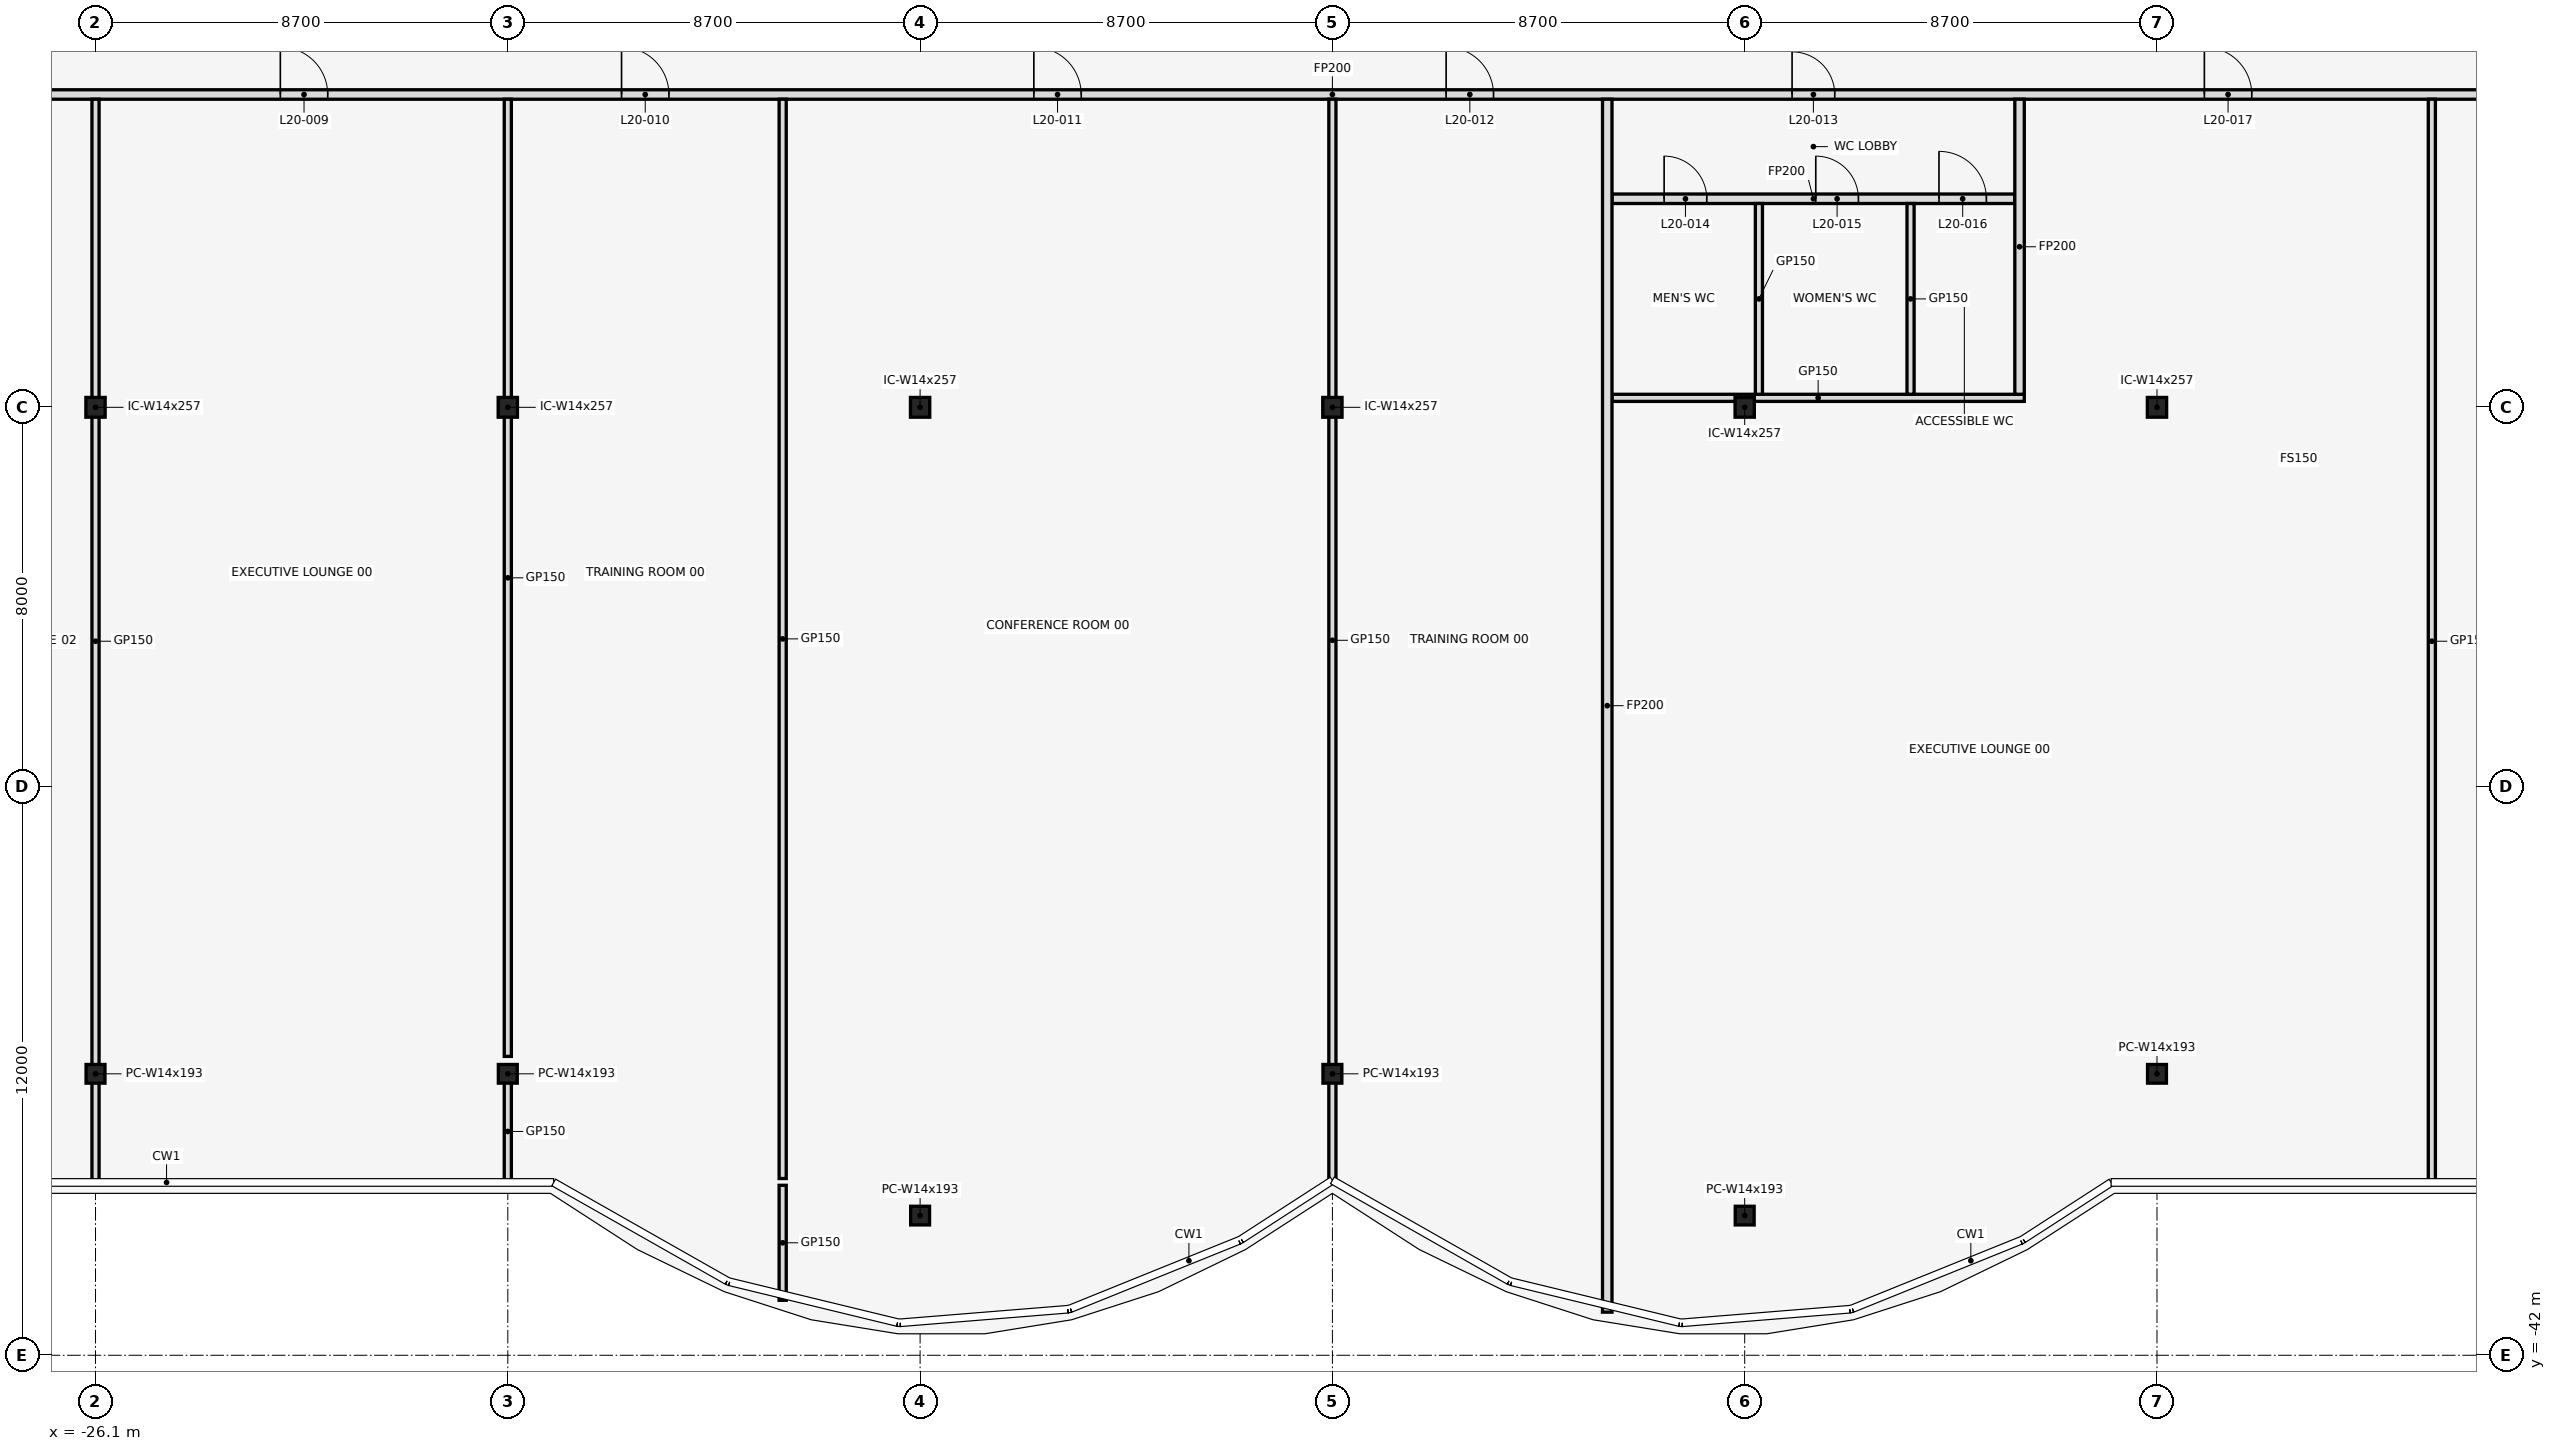
"""IFC4 building model, lengths in metres.
Left out: names, types, materials, properties, quantities, classifications, styles, units other than length and angle.
Written with IfcOpenShell. Run it as: python <this file> out.ifc"""

import sys

from ifc_helpers import new_model, si_unit, direction, frame, frame_2d, origin, origin_2d, place, context, subcontext, project, spatial, rectangle, i_section, extrude, element, fill, save


model = new_model("IFC4")
c1 = context("Model", 3, precision=1e-05, world=origin(), true_north=direction((0.0, 1.0)))
c2 = subcontext(c1, "Body", "Model", "MODEL_VIEW")
j1 = project(units=[si_unit("LENGTHUNIT", "METRE"), si_unit("PLANEANGLEUNIT", "RADIAN")], contexts=[c1])
p1 = place(None, origin())
s1 = spatial("IfcSite", under=j1, at=p1, CompositionType="ELEMENT")
p2 = place(p1, origin())
s2 = spatial("IfcBuilding", under=s1, at=p2, CompositionType="ELEMENT")
p3 = place(p2, frame((0.0, 0.0, 98.1)))
s3 = spatial("IfcBuildingStorey", under=s2, at=p3, CompositionType="ELEMENT", Elevation=98.1)
for number, where, z_axis, x_axis in (
    (1, (-26.1, -36.062, 0.0), (0.0, 0.0, 1.0), (1.0, 0.0, 0.0)),
    (2, (-17.4, -36.062, 0.0), (0.0, 0.0, 1.0), (1.0, 0.0, 0.0)),
    (3, (-8.7, -39.053, 0.0), (0.0, 0.0, 1.0), (1.0, 0.0, 0.0)),
    (4, (0.0, -36.062, 0.0), (0.0, 0.0, 1.0), (1.0, 0.0, 0.0)),
    (5, (8.7, -39.053, 0.0), (0.0, 0.0, 1.0), (1.0, 0.0, 0.0)),
    (6, (17.4, -36.062, 0.0), (0.0, 0.0, 1.0), (1.0, 0.0, 0.0)),
):
    element("IfcColumn", number, at=place(p3, frame(where, z_axis=z_axis, x_axis=x_axis)), inside=s3, PredefinedType="COLUMN", context=c2, shape_type="SweptSolid", body=[
        extrude(i_section(OverallWidth=0.399, OverallDepth=0.394, WebThickness=0.023, FlangeThickness=0.037, at=origin_2d()), origin(), (0.0, 0.0, 1.0), 4.1),
    ])
for number, where, z_axis, x_axis in (
    (7, (-26.1, -22.0, 0.0), (0.0, 0.0, 1.0), (1.0, 0.0, 0.0)),
    (8, (-17.4, -22.0, 0.0), (0.0, 0.0, 1.0), (1.0, 0.0, 0.0)),
    (9, (-8.7, -22.0, 0.0), (0.0, 0.0, 1.0), (1.0, 0.0, 0.0)),
    (10, (0.0, -22.0, 0.0), (0.0, 0.0, 1.0), (1.0, 0.0, 0.0)),
    (11, (8.7, -22.0, 0.0), (0.0, 0.0, 1.0), (1.0, 0.0, 0.0)),
    (12, (17.4, -22.0, 0.0), (0.0, 0.0, 1.0), (1.0, 0.0, 0.0)),
):
    element("IfcColumn", number, at=place(p3, frame(where, z_axis=z_axis, x_axis=x_axis)), inside=s3, PredefinedType="COLUMN", context=c2, shape_type="SweptSolid", body=[
        extrude(i_section(OverallWidth=0.406, OverallDepth=0.417, WebThickness=0.03, FlangeThickness=0.048, at=origin_2d()), origin(), (0.0, 0.0, 1.0), 4.1),
    ])
p4 = place(p3, frame((5.9, -21.8, 0.0), z_axis=(0.0, 0.0, 1.0), x_axis=(1.0, 0.0, 0.0)))
e13 = element("IfcWall", 13, at=p4, inside=s3, PredefinedType="PARTITIONING", context=c2, shape_type="SweptSolid", body=[
    extrude(rectangle(XDim=8.7, YDim=0.15, at=frame_2d((4.35, 0.0))), origin(), (0.0, 0.0, 1.0), 3.018),
])
p5 = place(p3, frame((5.9, -17.6, 0.0), z_axis=(0.0, 0.0, 1.0), x_axis=(1.0, 0.0, 0.0)))
e14 = element("IfcWall", 14, at=p5, inside=s3, PredefinedType="PARTITIONING", context=c2, shape_type="SweptSolid", body=[
    extrude(rectangle(XDim=8.5, YDim=0.2, at=frame_2d((4.25, 0.0))), origin(), (0.0, 0.0, 1.0), 3.018),
])
p6 = place(p5, frame((1.1, 0.0, 0.0)))
e15 = element("IfcOpeningElement", 15, at=p6, cuts=e14, PredefinedType="OPENING", context=c2, shape_type="SweptSolid", body=[
    extrude(rectangle(XDim=0.9, YDim=2.1, at=frame_2d((0.45, 1.05))), frame((0.0, 0.112, 0.0), z_axis=(0.0, -1.0, 0.0), x_axis=(1.0, 0.0, 0.0)), (0.0, 0.0, 1.0), 0.224),
])
p7 = place(p5, frame((4.3, 0.0, 0.0)))
e16 = element("IfcOpeningElement", 16, at=p7, cuts=e14, PredefinedType="OPENING", context=c2, shape_type="SweptSolid", body=[
    extrude(rectangle(XDim=0.9, YDim=2.1, at=frame_2d((0.45, 1.05))), frame((0.0, 0.112, 0.0), z_axis=(0.0, -1.0, 0.0), x_axis=(1.0, 0.0, 0.0)), (0.0, 0.0, 1.0), 0.224),
])
p8 = place(p5, frame((6.9, 0.0, 0.0)))
e17 = element("IfcOpeningElement", 17, at=p8, cuts=e14, PredefinedType="OPENING", context=c2, shape_type="SweptSolid", body=[
    extrude(rectangle(XDim=1.0, YDim=2.1, at=frame_2d((0.5, 1.05))), frame((0.0, 0.112, 0.0), z_axis=(0.0, -1.0, 0.0), x_axis=(1.0, 0.0, 0.0)), (0.0, 0.0, 1.0), 0.224),
])
p9 = place(p3, frame((-35.68, -15.4, 0.0), z_axis=(0.0, 0.0, 1.0), x_axis=(1.0, 0.0, 0.0)))
e18 = element("IfcWall", 18, at=p9, inside=s3, PredefinedType="PARTITIONING", context=c2, shape_type="SweptSolid", body=[
    extrude(rectangle(XDim=71.36, YDim=0.2, at=frame_2d((35.68, 0.0))), origin(), (0.0, 0.0, 1.0), 3.018),
])
p10 = place(p9, frame((2.8, 0.0, 0.0)))
e19 = element("IfcOpeningElement", 19, at=p10, cuts=e18, PredefinedType="OPENING", context=c2, shape_type="SweptSolid", body=[
    extrude(rectangle(XDim=1.0, YDim=2.1, at=frame_2d((0.5, 1.05))), frame((0.0, 0.112, 0.0), z_axis=(0.0, -1.0, 0.0), x_axis=(1.0, 0.0, 0.0)), (0.0, 0.0, 1.0), 0.224),
])
p11 = place(p9, frame((7.58, 0.0, 0.0)))
e20 = element("IfcOpeningElement", 20, at=p11, cuts=e18, PredefinedType="OPENING", context=c2, shape_type="SweptSolid", body=[
    extrude(rectangle(XDim=1.0, YDim=2.1, at=frame_2d((0.5, 1.05))), frame((0.0, 0.112, 0.0), z_axis=(0.0, -1.0, 0.0), x_axis=(1.0, 0.0, 0.0)), (0.0, 0.0, 1.0), 0.224),
])
p12 = place(p9, frame((13.48, 0.0, 0.0)))
e21 = element("IfcOpeningElement", 21, at=p12, cuts=e18, PredefinedType="OPENING", context=c2, shape_type="SweptSolid", body=[
    extrude(rectangle(XDim=1.0, YDim=2.1, at=frame_2d((0.5, 1.05))), frame((0.0, 0.112, 0.0), z_axis=(0.0, -1.0, 0.0), x_axis=(1.0, 0.0, 0.0)), (0.0, 0.0, 1.0), 0.224),
])
p13 = place(p9, frame((20.68, 0.0, 0.0)))
e22 = element("IfcOpeningElement", 22, at=p13, cuts=e18, PredefinedType="OPENING", context=c2, shape_type="SweptSolid", body=[
    extrude(rectangle(XDim=1.0, YDim=2.1, at=frame_2d((0.5, 1.05))), frame((0.0, 0.112, 0.0), z_axis=(0.0, -1.0, 0.0), x_axis=(1.0, 0.0, 0.0)), (0.0, 0.0, 1.0), 0.224),
])
p14 = place(p9, frame((29.38, 0.0, 0.0)))
e23 = element("IfcOpeningElement", 23, at=p14, cuts=e18, PredefinedType="OPENING", context=c2, shape_type="SweptSolid", body=[
    extrude(rectangle(XDim=1.0, YDim=2.1, at=frame_2d((0.5, 1.05))), frame((0.0, 0.112, 0.0), z_axis=(0.0, -1.0, 0.0), x_axis=(1.0, 0.0, 0.0)), (0.0, 0.0, 1.0), 0.224),
])
p15 = place(p9, frame((38.08, 0.0, 0.0)))
e24 = element("IfcOpeningElement", 24, at=p15, cuts=e18, PredefinedType="OPENING", context=c2, shape_type="SweptSolid", body=[
    extrude(rectangle(XDim=1.0, YDim=2.1, at=frame_2d((0.5, 1.05))), frame((0.0, 0.112, 0.0), z_axis=(0.0, -1.0, 0.0), x_axis=(1.0, 0.0, 0.0)), (0.0, 0.0, 1.0), 0.224),
])
p16 = place(p9, frame((45.38, 0.0, 0.0)))
e25 = element("IfcOpeningElement", 25, at=p16, cuts=e18, PredefinedType="OPENING", context=c2, shape_type="SweptSolid", body=[
    extrude(rectangle(XDim=0.9, YDim=2.1, at=frame_2d((0.45, 1.05))), frame((0.0, 0.112, 0.0), z_axis=(0.0, -1.0, 0.0), x_axis=(1.0, 0.0, 0.0)), (0.0, 0.0, 1.0), 0.224),
])
p17 = place(p9, frame((54.08, 0.0, 0.0)))
e26 = element("IfcOpeningElement", 26, at=p17, cuts=e18, PredefinedType="OPENING", context=c2, shape_type="SweptSolid", body=[
    extrude(rectangle(XDim=1.0, YDim=2.1, at=frame_2d((0.5, 1.05))), frame((0.0, 0.112, 0.0), z_axis=(0.0, -1.0, 0.0), x_axis=(1.0, 0.0, 0.0)), (0.0, 0.0, 1.0), 0.224),
])
p18 = place(p9, frame((64.58, 0.0, 0.0)))
e27 = element("IfcOpeningElement", 27, at=p18, cuts=e18, PredefinedType="OPENING", context=c2, shape_type="SweptSolid", body=[
    extrude(rectangle(XDim=1.0, YDim=2.1, at=frame_2d((0.5, 1.05))), frame((0.0, 0.112, 0.0), z_axis=(0.0, -1.0, 0.0), x_axis=(1.0, 0.0, 0.0)), (0.0, 0.0, 1.0), 0.224),
])
p19 = place(p3, frame((-26.1, -38.37, 0.0), z_axis=(0.0, 0.0, 1.0), x_axis=(0.0, 1.0, 0.0)))
e28 = element("IfcWall", 28, at=p19, inside=s3, PredefinedType="PARTITIONING", context=c2, shape_type="SweptSolid", body=[
    extrude(rectangle(XDim=22.87, YDim=0.15, at=frame_2d((11.435, 0.0))), origin(), (0.0, 0.0, 1.0), 3.018),
])
p20 = place(p3, frame((-17.4, -38.37, 0.0), z_axis=(0.0, 0.0, 1.0), x_axis=(0.0, 1.0, 0.0)))
e29 = element("IfcWall", 29, at=p20, inside=s3, PredefinedType="PARTITIONING", context=c2, shape_type="SweptSolid", body=[
    extrude(rectangle(XDim=2.184, YDim=0.15, at=frame_2d((1.092, 0.0))), origin(), (0.0, 0.0, 1.0), 3.018),
])
p21 = place(p3, frame((-17.4, -35.694, 0.0), z_axis=(0.0, 0.0, 1.0), x_axis=(0.0, 1.0, 0.0)))
e30 = element("IfcWall", 30, at=p21, inside=s3, PredefinedType="PARTITIONING", context=c2, shape_type="SweptSolid", body=[
    extrude(rectangle(XDim=20.194, YDim=0.15, at=frame_2d((10.097, 0.0))), origin(), (0.0, 0.0, 1.0), 3.018),
])
p22 = place(p3, frame((-11.6, -40.84, 0.0), z_axis=(0.0, 0.0, 1.0), x_axis=(0.0, 1.0, 0.0)))
e31 = element("IfcWall", 31, at=p22, inside=s3, PredefinedType="PARTITIONING", context=c2, shape_type="SweptSolid", body=[
    extrude(rectangle(XDim=2.426, YDim=0.15, at=frame_2d((1.213, 0.0))), origin(), (0.0, 0.0, 1.0), 3.018),
])
p23 = place(p3, frame((-11.6, -38.271, 0.0), z_axis=(0.0, 0.0, 1.0), x_axis=(0.0, 1.0, 0.0)))
e32 = element("IfcWall", 32, at=p23, inside=s3, PredefinedType="PARTITIONING", context=c2, shape_type="SweptSolid", body=[
    extrude(rectangle(XDim=22.771, YDim=0.15, at=frame_2d((11.385, 0.0))), origin(), (0.0, 0.0, 1.0), 3.018),
])
p24 = place(p3, frame((0.0, -38.33, 0.0), z_axis=(0.0, 0.0, 1.0), x_axis=(0.0, 1.0, 0.0)))
e33 = element("IfcWall", 33, at=p24, inside=s3, PredefinedType="PARTITIONING", context=c2, shape_type="SweptSolid", body=[
    extrude(rectangle(XDim=22.83, YDim=0.15, at=frame_2d((11.415, 0.0))), origin(), (0.0, 0.0, 1.0), 3.018),
])
p25 = place(p3, frame((5.8, -41.09, 0.0), z_axis=(0.0, 0.0, 1.0), x_axis=(0.0, 1.0, 0.0)))
e34 = element("IfcWall", 34, at=p25, inside=s3, PredefinedType="PARTITIONING", context=c2, shape_type="SweptSolid", body=[
    extrude(rectangle(XDim=25.59, YDim=0.2, at=frame_2d((12.795, 0.0))), origin(), (0.0, 0.0, 1.0), 3.018),
])
for number, where, z_axis, x_axis in (
    (35, (9.0, -21.725, 0.0), (0.0, 0.0, 1.0), (0.0, 1.0, 0.0)),
    (36, (12.2, -21.725, 0.0), (0.0, 0.0, 1.0), (0.0, 1.0, 0.0)),
):
    element("IfcWall", number, at=place(p3, frame(where, z_axis=z_axis, x_axis=x_axis)), inside=s3, PredefinedType="PARTITIONING", context=c2, shape_type="SweptSolid", body=[
        extrude(rectangle(XDim=4.025, YDim=0.15, at=frame_2d((2.013, 0.0))), origin(), (0.0, 0.0, 1.0), 3.018),
    ])
p26 = place(p3, frame((14.5, -21.725, 0.0), z_axis=(0.0, 0.0, 1.0), x_axis=(0.0, 1.0, 0.0)))
e37 = element("IfcWall", 37, at=p26, inside=s3, PredefinedType="PARTITIONING", context=c2, shape_type="SweptSolid", body=[
    extrude(rectangle(XDim=6.225, YDim=0.2, at=frame_2d((3.113, 0.0))), origin(), (0.0, 0.0, 1.0), 3.018),
])
p27 = place(p3, frame((23.2, -38.37, 0.0), z_axis=(0.0, 0.0, 1.0), x_axis=(0.0, 1.0, 0.0)))
e38 = element("IfcWall", 38, at=p27, inside=s3, PredefinedType="PARTITIONING", context=c2, shape_type="SweptSolid", body=[
    extrude(rectangle(XDim=22.87, YDim=0.15, at=frame_2d((11.435, 0.0))), origin(), (0.0, 0.0, 1.0), 3.018),
])
p28 = place(p12, frame((1.0, 0.0, 0.0), z_axis=(0.0, 0.0, 1.0), x_axis=(-1.0, 0.0, 0.0)))
e39 = element("IfcDoor", 39, at=p28, inside=s3, OperationType="SINGLE_SWING_RIGHT", PredefinedType="DOOR", context=c2, shape_type="SweptSolid", body=[
    extrude(rectangle(XDim=1.0, YDim=2.1, at=frame_2d((0.5, 1.05))), frame((0.0, 0.025, 0.0), z_axis=(0.0, -1.0, 0.0), x_axis=(1.0, 0.0, 0.0)), (0.0, 0.0, 1.0), 0.05),
])
fill(e21, e39)
p29 = place(p13, frame((1.0, 0.0, 0.0), z_axis=(0.0, 0.0, 1.0), x_axis=(-1.0, 0.0, 0.0)))
e40 = element("IfcDoor", 40, at=p29, inside=s3, OperationType="SINGLE_SWING_LEFT", PredefinedType="DOOR", context=c2, shape_type="SweptSolid", body=[
    extrude(rectangle(XDim=1.0, YDim=2.1, at=frame_2d((0.5, 1.05))), frame((0.0, 0.025, 0.0), z_axis=(0.0, -1.0, 0.0), x_axis=(1.0, 0.0, 0.0)), (0.0, 0.0, 1.0), 0.05),
])
fill(e22, e40)
p30 = place(p14, frame((1.0, 0.0, 0.0), z_axis=(0.0, 0.0, 1.0), x_axis=(-1.0, 0.0, 0.0)))
e41 = element("IfcDoor", 41, at=p30, inside=s3, OperationType="SINGLE_SWING_RIGHT", PredefinedType="DOOR", context=c2, shape_type="SweptSolid", body=[
    extrude(rectangle(XDim=1.0, YDim=2.1, at=frame_2d((0.5, 1.05))), frame((0.0, 0.025, 0.0), z_axis=(0.0, -1.0, 0.0), x_axis=(1.0, 0.0, 0.0)), (0.0, 0.0, 1.0), 0.05),
])
fill(e23, e41)
p31 = place(p15, frame((1.0, 0.0, 0.0), z_axis=(0.0, 0.0, 1.0), x_axis=(-1.0, 0.0, 0.0)))
e42 = element("IfcDoor", 42, at=p31, inside=s3, OperationType="SINGLE_SWING_RIGHT", PredefinedType="DOOR", context=c2, shape_type="SweptSolid", body=[
    extrude(rectangle(XDim=1.0, YDim=2.1, at=frame_2d((0.5, 1.05))), frame((0.0, 0.025, 0.0), z_axis=(0.0, -1.0, 0.0), x_axis=(1.0, 0.0, 0.0)), (0.0, 0.0, 1.0), 0.05),
])
fill(e24, e42)
p32 = place(p16, frame((0.9, 0.0, 0.0), z_axis=(0.0, 0.0, 1.0), x_axis=(-1.0, 0.0, 0.0)))
e43 = element("IfcDoor", 43, at=p32, inside=s3, OperationType="SINGLE_SWING_LEFT", PredefinedType="DOOR", context=c2, shape_type="SweptSolid", body=[
    extrude(rectangle(XDim=0.9, YDim=2.1, at=frame_2d((0.45, 1.05))), frame((0.0, 0.025, 0.0), z_axis=(0.0, -1.0, 0.0), x_axis=(1.0, 0.0, 0.0)), (0.0, 0.0, 1.0), 0.05),
])
fill(e25, e43)
p33 = place(p6, frame((0.9, 0.0, 0.0), z_axis=(0.0, 0.0, 1.0), x_axis=(-1.0, 0.0, 0.0)))
e44 = element("IfcDoor", 44, at=p33, inside=s3, OperationType="SINGLE_SWING_RIGHT", PredefinedType="DOOR", context=c2, shape_type="SweptSolid", body=[
    extrude(rectangle(XDim=0.9, YDim=2.1, at=frame_2d((0.45, 1.05))), frame((0.0, 0.025, 0.0), z_axis=(0.0, -1.0, 0.0), x_axis=(1.0, 0.0, 0.0)), (0.0, 0.0, 1.0), 0.05),
])
fill(e15, e44)
p34 = place(p7, frame((0.9, 0.0, 0.0), z_axis=(0.0, 0.0, 1.0), x_axis=(-1.0, 0.0, 0.0)))
e45 = element("IfcDoor", 45, at=p34, inside=s3, OperationType="SINGLE_SWING_RIGHT", PredefinedType="DOOR", context=c2, shape_type="SweptSolid", body=[
    extrude(rectangle(XDim=0.9, YDim=2.1, at=frame_2d((0.45, 1.05))), frame((0.0, 0.025, 0.0), z_axis=(0.0, -1.0, 0.0), x_axis=(1.0, 0.0, 0.0)), (0.0, 0.0, 1.0), 0.05),
])
fill(e16, e45)
p35 = place(p8, frame((1.0, 0.0, 0.0), z_axis=(0.0, 0.0, 1.0), x_axis=(-1.0, 0.0, 0.0)))
e46 = element("IfcDoor", 46, at=p35, inside=s3, OperationType="SINGLE_SWING_LEFT", PredefinedType="DOOR", context=c2, shape_type="SweptSolid", body=[
    extrude(rectangle(XDim=1.0, YDim=2.1, at=frame_2d((0.5, 1.05))), frame((0.0, 0.025, 0.0), z_axis=(0.0, -1.0, 0.0), x_axis=(1.0, 0.0, 0.0)), (0.0, 0.0, 1.0), 0.05),
])
fill(e17, e46)
p36 = place(p17, frame((1.0, 0.0, 0.0), z_axis=(0.0, 0.0, 1.0), x_axis=(-1.0, 0.0, 0.0)))
e47 = element("IfcDoor", 47, at=p36, inside=s3, OperationType="SINGLE_SWING_RIGHT", PredefinedType="DOOR", context=c2, shape_type="SweptSolid", body=[
    extrude(rectangle(XDim=1.0, YDim=2.1, at=frame_2d((0.5, 1.05))), frame((0.0, 0.025, 0.0), z_axis=(0.0, -1.0, 0.0), x_axis=(1.0, 0.0, 0.0)), (0.0, 0.0, 1.0), 0.05),
])
fill(e26, e47)
save(model, sys.argv[1])
